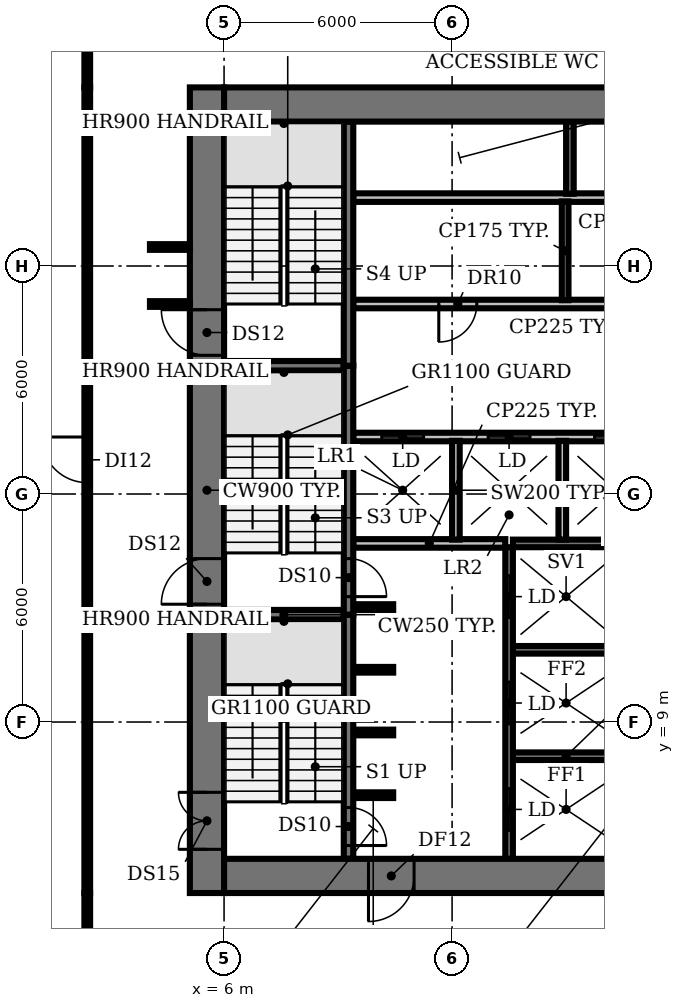
"""IFC4 building model, lengths in metres.
Left out: names, types, materials, properties, quantities, classifications, styles, units other than length and angle.
Written with IfcOpenShell. Run it as: python <this file> out.ifc"""

import sys

from ifc_helpers import new_model, si_unit, direction, frame, frame_2d, origin, place, context, subcontext, project, spatial, rectangle, extrude, element, fill, save


model = new_model("IFC4")
c1 = context("Model", 3, precision=1e-05, world=origin(), true_north=direction((0.0, 1.0)))
c2 = subcontext(c1, "Body", "Model", "MODEL_VIEW")
j1 = project(units=[si_unit("LENGTHUNIT", "METRE"), si_unit("PLANEANGLEUNIT", "RADIAN")], contexts=[c1])
p1 = place(None, origin())
s1 = spatial("IfcSite", under=j1, at=p1, CompositionType="ELEMENT")
p2 = place(p1, origin())
s2 = spatial("IfcBuilding", under=s1, at=p2, CompositionType="ELEMENT")
p3 = place(p2, frame((0.0, 0.0, 71.0)))
s3 = spatial("IfcBuildingStorey", under=s2, at=p3, CompositionType="ELEMENT", Elevation=71.0)
p4 = place(p3, frame((9.4, 7.075, 0.0), z_axis=(0.0, 0.0, 1.0), x_axis=(1.0, 0.0, 0.0)))
e1 = element("IfcWall", 1, at=p4, inside=s3, PredefinedType="SHEAR", context=c2, shape_type="SweptSolid", body=[
    extrude(rectangle(XDim=1.05, YDim=0.15, at=frame_2d((0.525, 0.0))), origin(), (0.0, 0.0, 1.0), 3.85),
])
p5 = place(p3, frame((13.6, 8.1, 0.0), z_axis=(0.0, 0.0, 1.0), x_axis=(1.0, 0.0, 0.0)))
e2 = element("IfcWall", 2, at=p5, inside=s3, PredefinedType="SHEAR", context=c2, shape_type="SweptSolid", body=[
    extrude(rectangle(XDim=2.8, YDim=0.2, at=frame_2d((1.4, 0.0))), origin(), (0.0, 0.0, 1.0), 3.85),
])
for number, where, z_axis, x_axis in (
    (3, (9.4, 8.725, 0.0), (0.0, 0.0, 1.0), (1.0, 0.0, 0.0)),
    (4, (9.4, 10.375, 0.0), (0.0, 0.0, 1.0), (1.0, 0.0, 0.0)),
):
    element("IfcWall", number, at=place(p3, frame(where, z_axis=z_axis, x_axis=x_axis)), inside=s3, PredefinedType="SHEAR", context=c2, shape_type="SweptSolid", body=[
        extrude(rectangle(XDim=1.05, YDim=0.15, at=frame_2d((0.525, 0.0))), origin(), (0.0, 0.0, 1.0), 3.85),
    ])
p6 = place(p3, frame((13.6, 10.9, 0.0), z_axis=(0.0, 0.0, 1.0), x_axis=(1.0, 0.0, 0.0)))
e5 = element("IfcWall", 5, at=p6, inside=s3, PredefinedType="SHEAR", context=c2, shape_type="SweptSolid", body=[
    extrude(rectangle(XDim=2.8, YDim=0.2, at=frame_2d((1.4, 0.0))), origin(), (0.0, 0.0, 1.0), 3.85),
])
p7 = place(p3, frame((6.0, 11.825, 0.0), z_axis=(0.0, 0.0, 1.0), x_axis=(1.0, 0.0, 0.0)))
e6 = element("IfcWall", 6, at=p7, inside=s3, PredefinedType="SHEAR", context=c2, shape_type="SweptSolid", body=[
    extrude(rectangle(XDim=3.15, YDim=0.25, at=frame_2d((1.575, 0.0))), origin(), (0.0, 0.0, 1.0), 3.85),
])
p8 = place(p3, frame((9.4, 12.025, 0.0), z_axis=(0.0, 0.0, 1.0), x_axis=(1.0, 0.0, 0.0)))
e7 = element("IfcWall", 7, at=p8, inside=s3, PredefinedType="SHEAR", context=c2, shape_type="SweptSolid", body=[
    extrude(rectangle(XDim=1.05, YDim=0.15, at=frame_2d((0.525, 0.0))), origin(), (0.0, 0.0, 1.0), 3.85),
])
p9 = place(p3, frame((9.4, 13.7, 0.0), z_axis=(0.0, 0.0, 1.0), x_axis=(1.0, 0.0, 0.0)))
e8 = element("IfcWall", 8, at=p9, inside=s3, PredefinedType="PARTITIONING", context=c2, shape_type="SweptSolid", body=[
    extrude(rectangle(XDim=4.0, YDim=0.225, at=frame_2d((2.0, 0.0))), origin(), (0.0, 0.0, 1.0), 3.85),
])
p10 = place(p3, frame((13.6, 13.7, 0.0), z_axis=(0.0, 0.0, 1.0), x_axis=(1.0, 0.0, 0.0)))
e9 = element("IfcWall", 9, at=p10, inside=s3, PredefinedType="SHEAR", context=c2, shape_type="SweptSolid", body=[
    extrude(rectangle(XDim=2.8, YDim=0.2, at=frame_2d((1.4, 0.0))), origin(), (0.0, 0.0, 1.0), 3.85),
])
p11 = place(p3, frame((9.4, 16.5, 0.0), z_axis=(0.0, 0.0, 1.0), x_axis=(1.0, 0.0, 0.0)))
e10 = element("IfcWall", 10, at=p11, inside=s3, PredefinedType="PARTITIONING", context=c2, shape_type="SweptSolid", body=[
    extrude(rectangle(XDim=14.6, YDim=0.225, at=frame_2d((7.3, 0.0))), origin(), (0.0, 0.0, 1.0), 3.85),
])
p12 = place(p11, frame((0.75, 0.0, 0.0)))
e11 = element("IfcOpeningElement", 11, at=p12, cuts=e10, PredefinedType="OPENING", context=c2, shape_type="SweptSolid", body=[
    extrude(rectangle(XDim=1.1, YDim=2.1, at=frame_2d((0.55, 1.05))), frame((0.0, 0.123, 0.0), z_axis=(0.0, -1.0, 0.0), x_axis=(1.0, 0.0, 0.0)), (0.0, 0.0, 1.0), 0.245),
])
p13 = place(p11, frame((3.55, 0.0, 0.0)))
e12 = element("IfcOpeningElement", 12, at=p13, cuts=e10, PredefinedType="OPENING", context=c2, shape_type="SweptSolid", body=[
    extrude(rectangle(XDim=1.1, YDim=2.1, at=frame_2d((0.55, 1.05))), frame((0.0, 0.123, 0.0), z_axis=(0.0, -1.0, 0.0), x_axis=(1.0, 0.0, 0.0)), (0.0, 0.0, 1.0), 0.245),
])
p14 = place(p11, frame((6.35, 0.0, 0.0)))
e13 = element("IfcOpeningElement", 13, at=p14, cuts=e10, PredefinedType="OPENING", context=c2, shape_type="SweptSolid", body=[
    extrude(rectangle(XDim=1.1, YDim=2.1, at=frame_2d((0.55, 1.05))), frame((0.0, 0.123, 0.0), z_axis=(0.0, -1.0, 0.0), x_axis=(1.0, 0.0, 0.0)), (0.0, 0.0, 1.0), 0.245),
])
p15 = place(p11, frame((9.15, 0.0, 0.0)))
e14 = element("IfcOpeningElement", 14, at=p15, cuts=e10, PredefinedType="OPENING", context=c2, shape_type="SweptSolid", body=[
    extrude(rectangle(XDim=1.1, YDim=2.1, at=frame_2d((0.55, 1.05))), frame((0.0, 0.123, 0.0), z_axis=(0.0, -1.0, 0.0), x_axis=(1.0, 0.0, 0.0)), (0.0, 0.0, 1.0), 0.245),
])
p16 = place(p11, frame((11.308, 0.0, 0.0)))
e15 = element("IfcOpeningElement", 15, at=p16, cuts=e10, PredefinedType="OPENING", context=c2, shape_type="SweptSolid", body=[
    extrude(rectangle(XDim=0.9, YDim=2.1, at=frame_2d((0.45, 1.05))), frame((0.0, 0.123, 0.0), z_axis=(0.0, -1.0, 0.0), x_axis=(1.0, 0.0, 0.0)), (0.0, 0.0, 1.0), 0.245),
])
p17 = place(p11, frame((13.083, 0.0, 0.0)))
e16 = element("IfcOpeningElement", 16, at=p17, cuts=e10, PredefinedType="OPENING", context=c2, shape_type="SweptSolid", body=[
    extrude(rectangle(XDim=0.9, YDim=2.1, at=frame_2d((0.45, 1.05))), frame((0.0, 0.123, 0.0), z_axis=(0.0, -1.0, 0.0), x_axis=(1.0, 0.0, 0.0)), (0.0, 0.0, 1.0), 0.245),
])
p18 = place(p3, frame((6.0, 18.375, 0.0), z_axis=(0.0, 0.0, 1.0), x_axis=(1.0, 0.0, 0.0)))
e17 = element("IfcWall", 17, at=p18, inside=s3, PredefinedType="SHEAR", context=c2, shape_type="SweptSolid", body=[
    extrude(rectangle(XDim=3.15, YDim=0.25, at=frame_2d((1.575, 0.0))), origin(), (0.0, 0.0, 1.0), 3.85),
])
p19 = place(p3, frame((24.0, 20.0, 0.0), z_axis=(0.0, 0.0, 1.0), x_axis=(-1.0, 0.0, 0.0)))
e18 = element("IfcWall", 18, at=p19, inside=s3, PredefinedType="PARTITIONING", context=c2, shape_type="SweptSolid", body=[
    extrude(rectangle(XDim=14.6, YDim=0.225, at=frame_2d((7.3, 0.0))), origin(), (0.0, 0.0, 1.0), 3.85),
])
p20 = place(p19, frame((11.35, 0.0, 0.0)))
e19 = element("IfcOpeningElement", 19, at=p20, cuts=e18, PredefinedType="OPENING", context=c2, shape_type="SweptSolid", body=[
    extrude(rectangle(XDim=1.0, YDim=2.1, at=frame_2d((0.5, 1.05))), frame((0.0, 0.123, 0.0), z_axis=(0.0, -1.0, 0.0), x_axis=(1.0, 0.0, 0.0)), (0.0, 0.0, 1.0), 0.245),
])
p21 = place(p19, frame((5.775, 0.0, 0.0)))
e20 = element("IfcOpeningElement", 20, at=p21, cuts=e18, PredefinedType="OPENING", context=c2, shape_type="SweptSolid", body=[
    extrude(rectangle(XDim=1.0, YDim=2.1, at=frame_2d((0.5, 1.05))), frame((0.0, 0.123, 0.0), z_axis=(0.0, -1.0, 0.0), x_axis=(1.0, 0.0, 0.0)), (0.0, 0.0, 1.0), 0.245),
])
p22 = place(p19, frame((2.308, 0.0, 0.0)))
e21 = element("IfcOpeningElement", 21, at=p22, cuts=e18, PredefinedType="OPENING", context=c2, shape_type="SweptSolid", body=[
    extrude(rectangle(XDim=0.9, YDim=2.1, at=frame_2d((0.45, 1.05))), frame((0.0, 0.123, 0.0), z_axis=(0.0, -1.0, 0.0), x_axis=(1.0, 0.0, 0.0)), (0.0, 0.0, 1.0), 0.245),
])
p23 = place(p19, frame((0.532, 0.0, 0.0)))
e22 = element("IfcOpeningElement", 22, at=p23, cuts=e18, PredefinedType="OPENING", context=c2, shape_type="SweptSolid", body=[
    extrude(rectangle(XDim=0.9, YDim=2.1, at=frame_2d((0.45, 1.05))), frame((0.0, 0.123, 0.0), z_axis=(0.0, -1.0, 0.0), x_axis=(1.0, 0.0, 0.0)), (0.0, 0.0, 1.0), 0.245),
])
p24 = place(p3, frame((9.4, 22.8, 0.0), z_axis=(0.0, 0.0, 1.0), x_axis=(1.0, 0.0, 0.0)))
e23 = element("IfcWall", 23, at=p24, inside=s3, PredefinedType="PARTITIONING", context=c2, shape_type="SweptSolid", body=[
    extrude(rectangle(XDim=14.6, YDim=0.225, at=frame_2d((7.3, 0.0))), origin(), (0.0, 0.0, 1.0), 3.85),
])
p25 = place(p3, frame((9.275, 11.825, 0.0), z_axis=(0.0, 0.0, 1.0), x_axis=(0.0, -1.0, 0.0)))
e24 = element("IfcWall", 24, at=p25, inside=s3, PredefinedType="SHEAR", context=c2, shape_type="SweptSolid", body=[
    extrude(rectangle(XDim=6.425, YDim=0.25, at=frame_2d((3.212, 0.0))), origin(), (0.0, 0.0, 1.0), 3.85),
])
p26 = place(p25, frame((5.075, 0.0, 0.0)))
e25 = element("IfcOpeningElement", 25, at=p26, cuts=e24, PredefinedType="OPENING", context=c2, shape_type="SweptSolid", body=[
    extrude(rectangle(XDim=1.0, YDim=2.1, at=frame_2d((0.5, 1.05))), frame((0.0, 0.135, 0.0), z_axis=(0.0, -1.0, 0.0), x_axis=(1.0, 0.0, 0.0)), (0.0, 0.0, 1.0), 0.27),
])
p27 = place(p3, frame((9.275, 18.375, 0.0), z_axis=(0.0, 0.0, 1.0), x_axis=(0.0, -1.0, 0.0)))
e26 = element("IfcWall", 26, at=p27, inside=s3, PredefinedType="SHEAR", context=c2, shape_type="SweptSolid", body=[
    extrude(rectangle(XDim=6.55, YDim=0.25, at=frame_2d((3.275, 0.0))), origin(), (0.0, 0.0, 1.0), 3.85),
])
p28 = place(p27, frame((5.075, 0.0, 0.0)))
e27 = element("IfcOpeningElement", 27, at=p28, cuts=e26, PredefinedType="OPENING", context=c2, shape_type="SweptSolid", body=[
    extrude(rectangle(XDim=1.0, YDim=2.1, at=frame_2d((0.5, 1.05))), frame((0.0, 0.135, 0.0), z_axis=(0.0, -1.0, 0.0), x_axis=(1.0, 0.0, 0.0)), (0.0, 0.0, 1.0), 0.27),
])
p29 = place(p3, frame((9.275, 18.375, 0.0), z_axis=(0.0, 0.0, 1.0), x_axis=(0.0, 1.0, 0.0)))
e28 = element("IfcWall", 28, at=p29, inside=s3, PredefinedType="SHEAR", context=c2, shape_type="SweptSolid", body=[
    extrude(rectangle(XDim=6.425, YDim=0.25, at=frame_2d((3.212, 0.0))), origin(), (0.0, 0.0, 1.0), 3.85),
])
p30 = place(p3, frame((12.1, 13.8, 0.0), z_axis=(0.0, 0.0, 1.0), x_axis=(0.0, 1.0, 0.0)))
e29 = element("IfcWall", 29, at=p30, inside=s3, PredefinedType="SOLIDWALL", context=c2, shape_type="SweptSolid", body=[
    extrude(rectangle(XDim=2.6, YDim=0.2, at=frame_2d((1.3, 0.0))), origin(), (0.0, 0.0, 1.0), 3.85),
])
p31 = place(p3, frame((13.5, 5.4, 0.0), z_axis=(0.0, 0.0, 1.0), x_axis=(0.0, 1.0, 0.0)))
e30 = element("IfcWall", 30, at=p31, inside=s3, PredefinedType="SHEAR", context=c2, shape_type="SweptSolid", body=[
    extrude(rectangle(XDim=8.2, YDim=0.2, at=frame_2d((4.1, 0.0))), origin(), (0.0, 0.0, 1.0), 3.85),
])
p32 = place(p31, frame((0.75, 0.0, 0.0)))
e31 = element("IfcOpeningElement", 31, at=p32, cuts=e30, PredefinedType="OPENING", context=c2, shape_type="SweptSolid", body=[
    extrude(rectangle(XDim=1.1, YDim=2.1, at=frame_2d((0.55, 1.05))), frame((0.0, 0.11, 0.0), z_axis=(0.0, -1.0, 0.0), x_axis=(1.0, 0.0, 0.0)), (0.0, 0.0, 1.0), 0.22),
])
p33 = place(p31, frame((3.55, 0.0, 0.0)))
e32 = element("IfcOpeningElement", 32, at=p33, cuts=e30, PredefinedType="OPENING", context=c2, shape_type="SweptSolid", body=[
    extrude(rectangle(XDim=1.1, YDim=2.1, at=frame_2d((0.55, 1.05))), frame((0.0, 0.11, 0.0), z_axis=(0.0, -1.0, 0.0), x_axis=(1.0, 0.0, 0.0)), (0.0, 0.0, 1.0), 0.22),
])
p34 = place(p31, frame((6.35, 0.0, 0.0)))
e33 = element("IfcOpeningElement", 33, at=p34, cuts=e30, PredefinedType="OPENING", context=c2, shape_type="SweptSolid", body=[
    extrude(rectangle(XDim=1.1, YDim=2.1, at=frame_2d((0.55, 1.05))), frame((0.0, 0.11, 0.0), z_axis=(0.0, -1.0, 0.0), x_axis=(1.0, 0.0, 0.0)), (0.0, 0.0, 1.0), 0.22),
])
p35 = place(p3, frame((14.9, 13.8, 0.0), z_axis=(0.0, 0.0, 1.0), x_axis=(0.0, 1.0, 0.0)))
e34 = element("IfcWall", 34, at=p35, inside=s3, PredefinedType="SOLIDWALL", context=c2, shape_type="SweptSolid", body=[
    extrude(rectangle(XDim=2.6, YDim=0.2, at=frame_2d((1.3, 0.0))), origin(), (0.0, 0.0, 1.0), 3.85),
])
p36 = place(p3, frame((14.975, 20.1, 0.0), z_axis=(0.0, 0.0, 1.0), x_axis=(0.0, 1.0, 0.0)))
e35 = element("IfcWall", 35, at=p36, inside=s3, PredefinedType="PARTITIONING", context=c2, shape_type="SweptSolid", body=[
    extrude(rectangle(XDim=2.6, YDim=0.175, at=frame_2d((1.3, 0.0))), origin(), (0.0, 0.0, 1.0), 3.85),
])
p37 = place(p3, frame((15.1, 22.9, 0.0), z_axis=(0.0, 0.0, 1.0), x_axis=(0.0, 1.0, 0.0)))
e36 = element("IfcWall", 36, at=p37, inside=s3, PredefinedType="SHEAR", context=c2, shape_type="SweptSolid", body=[
    extrude(rectangle(XDim=1.9, YDim=0.2, at=frame_2d((0.95, 0.0))), origin(), (0.0, 0.0, 1.0), 3.85),
])
p38 = place(p3, frame((5.55, 4.5, 0.0), z_axis=(0.0, 0.0, 1.0), x_axis=(0.0, 1.0, 0.0)))
e37 = element("IfcWall", 37, at=p38, inside=s3, PredefinedType="SHEAR", context=c2, shape_type="SweptSolid", body=[
    extrude(rectangle(XDim=21.2, YDim=0.9, at=frame_2d((10.6, 0.0))), origin(), (0.0, 0.0, 1.0), 3.85),
])
p39 = place(p38, frame((1.15, 0.0, 0.0)))
e38 = element("IfcOpeningElement", 38, at=p39, cuts=e37, PredefinedType="OPENING", context=c2, shape_type="SweptSolid", body=[
    extrude(rectangle(XDim=1.5, YDim=2.1, at=frame_2d((0.75, 1.05))), frame((0.0, 0.46, 0.0), z_axis=(0.0, -1.0, 0.0), x_axis=(1.0, 0.0, 0.0)), (0.0, 0.0, 1.0), 0.92),
])
p40 = place(p38, frame((7.6, 0.0, 0.0)))
e39 = element("IfcOpeningElement", 39, at=p40, cuts=e37, PredefinedType="OPENING", context=c2, shape_type="SweptSolid", body=[
    extrude(rectangle(XDim=1.2, YDim=2.1, at=frame_2d((0.6, 1.05))), frame((0.0, 0.46, 0.0), z_axis=(0.0, -1.0, 0.0), x_axis=(1.0, 0.0, 0.0)), (0.0, 0.0, 1.0), 0.92),
])
p41 = place(p38, frame((14.15, 0.0, 0.0)))
e40 = element("IfcOpeningElement", 40, at=p41, cuts=e37, PredefinedType="OPENING", context=c2, shape_type="SweptSolid", body=[
    extrude(rectangle(XDim=1.2, YDim=2.1, at=frame_2d((0.6, 1.05))), frame((0.0, 0.46, 0.0), z_axis=(0.0, -1.0, 0.0), x_axis=(1.0, 0.0, 0.0)), (0.0, 0.0, 1.0), 0.92),
])
p42 = place(p3, frame((24.0, 4.95, 0.0), z_axis=(0.0, 0.0, 1.0), x_axis=(-1.0, 0.0, 0.0)))
e41 = element("IfcWall", 41, at=p42, inside=s3, PredefinedType="SHEAR", context=c2, shape_type="SweptSolid", body=[
    extrude(rectangle(XDim=18.0, YDim=0.9, at=frame_2d((9.0, 0.0))), origin(), (0.0, 0.0, 1.0), 3.85),
])
p43 = place(p42, frame((13.0, 0.0, 0.0)))
e42 = element("IfcOpeningElement", 42, at=p43, cuts=e41, PredefinedType="OPENING", context=c2, shape_type="SweptSolid", body=[
    extrude(rectangle(XDim=1.2, YDim=2.1, at=frame_2d((0.6, 1.05))), frame((0.0, 0.46, 0.0), z_axis=(0.0, -1.0, 0.0), x_axis=(1.0, 0.0, 0.0)), (0.0, 0.0, 1.0), 0.92),
])
p44 = place(p42, frame((4.9, 0.0, 0.0)))
e43 = element("IfcOpeningElement", 43, at=p44, cuts=e41, PredefinedType="OPENING", context=c2, shape_type="SweptSolid", body=[
    extrude(rectangle(XDim=1.0, YDim=2.1, at=frame_2d((0.5, 1.05))), frame((0.0, 0.46, 0.0), z_axis=(0.0, -1.0, 0.0), x_axis=(1.0, 0.0, 0.0)), (0.0, 0.0, 1.0), 0.92),
])
p45 = place(p3, frame((6.0, 25.25, 0.0), z_axis=(0.0, 0.0, 1.0), x_axis=(1.0, 0.0, 0.0)))
e44 = element("IfcWall", 44, at=p45, inside=s3, PredefinedType="SHEAR", context=c2, shape_type="SweptSolid", body=[
    extrude(rectangle(XDim=18.0, YDim=0.9, at=frame_2d((9.0, 0.0))), origin(), (0.0, 0.0, 1.0), 3.85),
])
p46 = place(p3, frame((2.4, 0.6, 0.0), z_axis=(0.0, 0.0, 1.0), x_axis=(0.0, 1.0, 0.0)))
e45 = element("IfcWall", 45, at=p46, inside=s3, PredefinedType="PARTITIONING", context=c2, shape_type="SweptSolid", body=[
    extrude(rectangle(XDim=3.9, YDim=0.15, at=frame_2d((1.95, 0.0))), origin(), (0.0, 0.0, 1.0), 2.83),
])
p47 = place(p3, frame((2.4, 4.5, 0.0), z_axis=(0.0, 0.0, 1.0), x_axis=(0.0, 1.0, 0.0)))
e46 = element("IfcWall", 46, at=p47, inside=s3, PredefinedType="PARTITIONING", context=c2, shape_type="SweptSolid", body=[
    extrude(rectangle(XDim=21.2, YDim=0.15, at=frame_2d((10.6, 0.0))), origin(), (0.0, 0.0, 1.0), 2.83),
])
p48 = place(p47, frame((10.8, 0.0, 0.0)))
e47 = element("IfcOpeningElement", 47, at=p48, cuts=e46, PredefinedType="OPENING", context=c2, shape_type="SweptSolid", body=[
    extrude(rectangle(XDim=1.2, YDim=2.1, at=frame_2d((0.6, 1.05))), frame((0.0, 0.085, 0.0), z_axis=(0.0, -1.0, 0.0), x_axis=(1.0, 0.0, 0.0)), (0.0, 0.0, 1.0), 0.17),
])
p49 = place(p3, frame((2.4, 25.7, 0.0), z_axis=(0.0, 0.0, 1.0), x_axis=(0.0, 1.0, 0.0)))
e48 = element("IfcWall", 48, at=p49, inside=s3, PredefinedType="PARTITIONING", context=c2, shape_type="SweptSolid", body=[
    extrude(rectangle(XDim=3.9, YDim=0.15, at=frame_2d((1.95, 0.0))), origin(), (0.0, 0.0, 1.0), 2.83),
])
for number, where, z_axis, x_axis in (
    (49, (4.05, 20.0, 0.0), (0.0, 0.0, 1.0), (1.0, 0.0, 0.0)),
    (50, (4.05, 21.5, 0.0), (0.0, 0.0, 1.0), (1.0, 0.0, 0.0)),
):
    element("IfcWall", number, at=place(p3, frame(where, z_axis=z_axis, x_axis=x_axis)), inside=s3, PredefinedType="PARTITIONING", context=c2, shape_type="SweptSolid", body=[
        extrude(rectangle(XDim=1.05, YDim=0.15, at=frame_2d((0.525, 0.0))), origin(), (0.0, 0.0, 1.0), 2.83),
    ])
p50 = place(p12, origin())
e51 = element("IfcDoor", 51, at=p50, inside=s3, OperationType="DOUBLE_DOOR_SLIDING", PredefinedType="DOOR", context=c2, shape_type="SweptSolid", body=[
    extrude(rectangle(XDim=1.1, YDim=2.1, at=frame_2d((0.55, 1.05))), frame((0.0, 0.025, 0.0), z_axis=(0.0, -1.0, 0.0), x_axis=(1.0, 0.0, 0.0)), (0.0, 0.0, 1.0), 0.05),
])
fill(e11, e51)
p51 = place(p13, origin())
e52 = element("IfcDoor", 52, at=p51, inside=s3, OperationType="DOUBLE_DOOR_SLIDING", PredefinedType="DOOR", context=c2, shape_type="SweptSolid", body=[
    extrude(rectangle(XDim=1.1, YDim=2.1, at=frame_2d((0.55, 1.05))), frame((0.0, 0.025, 0.0), z_axis=(0.0, -1.0, 0.0), x_axis=(1.0, 0.0, 0.0)), (0.0, 0.0, 1.0), 0.05),
])
fill(e12, e52)
p52 = place(p14, origin())
e53 = element("IfcDoor", 53, at=p52, inside=s3, OperationType="DOUBLE_DOOR_SLIDING", PredefinedType="DOOR", context=c2, shape_type="SweptSolid", body=[
    extrude(rectangle(XDim=1.1, YDim=2.1, at=frame_2d((0.55, 1.05))), frame((0.0, 0.025, 0.0), z_axis=(0.0, -1.0, 0.0), x_axis=(1.0, 0.0, 0.0)), (0.0, 0.0, 1.0), 0.05),
])
fill(e13, e53)
p53 = place(p20, origin())
e54 = element("IfcDoor", 54, at=p53, inside=s3, OperationType="SINGLE_SWING_RIGHT", PredefinedType="DOOR", context=c2, shape_type="SweptSolid", body=[
    extrude(rectangle(XDim=1.0, YDim=2.1, at=frame_2d((0.5, 1.05))), frame((0.0, 0.025, 0.0), z_axis=(0.0, -1.0, 0.0), x_axis=(1.0, 0.0, 0.0)), (0.0, 0.0, 1.0), 0.05),
])
fill(e19, e54)
p54 = place(p26, origin())
e55 = element("IfcDoor", 55, at=p54, inside=s3, OperationType="SINGLE_SWING_RIGHT", PredefinedType="DOOR", context=c2, shape_type="SweptSolid", body=[
    extrude(rectangle(XDim=1.0, YDim=2.1, at=frame_2d((0.5, 1.05))), frame((0.0, 0.025, 0.0), z_axis=(0.0, -1.0, 0.0), x_axis=(1.0, 0.0, 0.0)), (0.0, 0.0, 1.0), 0.05),
])
fill(e25, e55)
p55 = place(p28, origin())
e56 = element("IfcDoor", 56, at=p55, inside=s3, OperationType="SINGLE_SWING_RIGHT", PredefinedType="DOOR", context=c2, shape_type="SweptSolid", body=[
    extrude(rectangle(XDim=1.0, YDim=2.1, at=frame_2d((0.5, 1.05))), frame((0.0, 0.025, 0.0), z_axis=(0.0, -1.0, 0.0), x_axis=(1.0, 0.0, 0.0)), (0.0, 0.0, 1.0), 0.05),
])
fill(e27, e56)
p56 = place(p32, origin())
e57 = element("IfcDoor", 57, at=p56, inside=s3, OperationType="DOUBLE_DOOR_SLIDING", PredefinedType="DOOR", context=c2, shape_type="SweptSolid", body=[
    extrude(rectangle(XDim=1.1, YDim=2.1, at=frame_2d((0.55, 1.05))), frame((0.0, 0.025, 0.0), z_axis=(0.0, -1.0, 0.0), x_axis=(1.0, 0.0, 0.0)), (0.0, 0.0, 1.0), 0.05),
])
fill(e31, e57)
p57 = place(p33, origin())
e58 = element("IfcDoor", 58, at=p57, inside=s3, OperationType="DOUBLE_DOOR_SLIDING", PredefinedType="DOOR", context=c2, shape_type="SweptSolid", body=[
    extrude(rectangle(XDim=1.1, YDim=2.1, at=frame_2d((0.55, 1.05))), frame((0.0, 0.025, 0.0), z_axis=(0.0, -1.0, 0.0), x_axis=(1.0, 0.0, 0.0)), (0.0, 0.0, 1.0), 0.05),
])
fill(e32, e58)
p58 = place(p34, origin())
e59 = element("IfcDoor", 59, at=p58, inside=s3, OperationType="DOUBLE_DOOR_SLIDING", PredefinedType="DOOR", context=c2, shape_type="SweptSolid", body=[
    extrude(rectangle(XDim=1.1, YDim=2.1, at=frame_2d((0.55, 1.05))), frame((0.0, 0.025, 0.0), z_axis=(0.0, -1.0, 0.0), x_axis=(1.0, 0.0, 0.0)), (0.0, 0.0, 1.0), 0.05),
])
fill(e33, e59)
p59 = place(p39, origin())
e60 = element("IfcDoor", 60, at=p59, inside=s3, OperationType="DOUBLE_DOOR_SINGLE_SWING", PredefinedType="DOOR", context=c2, shape_type="SweptSolid", body=[
    extrude(rectangle(XDim=1.5, YDim=2.1, at=frame_2d((0.75, 1.05))), frame((0.0, 0.025, 0.0), z_axis=(0.0, -1.0, 0.0), x_axis=(1.0, 0.0, 0.0)), (0.0, 0.0, 1.0), 0.05),
])
fill(e38, e60)
p60 = place(p40, origin())
e61 = element("IfcDoor", 61, at=p60, inside=s3, OperationType="SINGLE_SWING_LEFT", PredefinedType="DOOR", context=c2, shape_type="SweptSolid", body=[
    extrude(rectangle(XDim=1.2, YDim=2.1, at=frame_2d((0.6, 1.05))), frame((0.0, 0.025, 0.0), z_axis=(0.0, -1.0, 0.0), x_axis=(1.0, 0.0, 0.0)), (0.0, 0.0, 1.0), 0.05),
])
fill(e39, e61)
p61 = place(p41, origin())
e62 = element("IfcDoor", 62, at=p61, inside=s3, OperationType="SINGLE_SWING_RIGHT", PredefinedType="DOOR", context=c2, shape_type="SweptSolid", body=[
    extrude(rectangle(XDim=1.2, YDim=2.1, at=frame_2d((0.6, 1.05))), frame((0.0, 0.025, 0.0), z_axis=(0.0, -1.0, 0.0), x_axis=(1.0, 0.0, 0.0)), (0.0, 0.0, 1.0), 0.05),
])
fill(e40, e62)
p62 = place(p43, origin())
e63 = element("IfcDoor", 63, at=p62, inside=s3, OperationType="SINGLE_SWING_RIGHT", PredefinedType="DOOR", context=c2, shape_type="SweptSolid", body=[
    extrude(rectangle(XDim=1.2, YDim=2.1, at=frame_2d((0.6, 1.05))), frame((0.0, 0.025, 0.0), z_axis=(0.0, -1.0, 0.0), x_axis=(1.0, 0.0, 0.0)), (0.0, 0.0, 1.0), 0.05),
])
fill(e42, e63)
p63 = place(p48, origin())
e64 = element("IfcDoor", 64, at=p63, inside=s3, OperationType="SINGLE_SWING_RIGHT", PredefinedType="DOOR", context=c2, shape_type="SweptSolid", body=[
    extrude(rectangle(XDim=1.2, YDim=2.1, at=frame_2d((0.6, 1.05))), frame((0.0, 0.025, 0.0), z_axis=(0.0, -1.0, 0.0), x_axis=(1.0, 0.0, 0.0)), (0.0, 0.0, 1.0), 0.05),
])
fill(e47, e64)
save(model, sys.argv[1])
